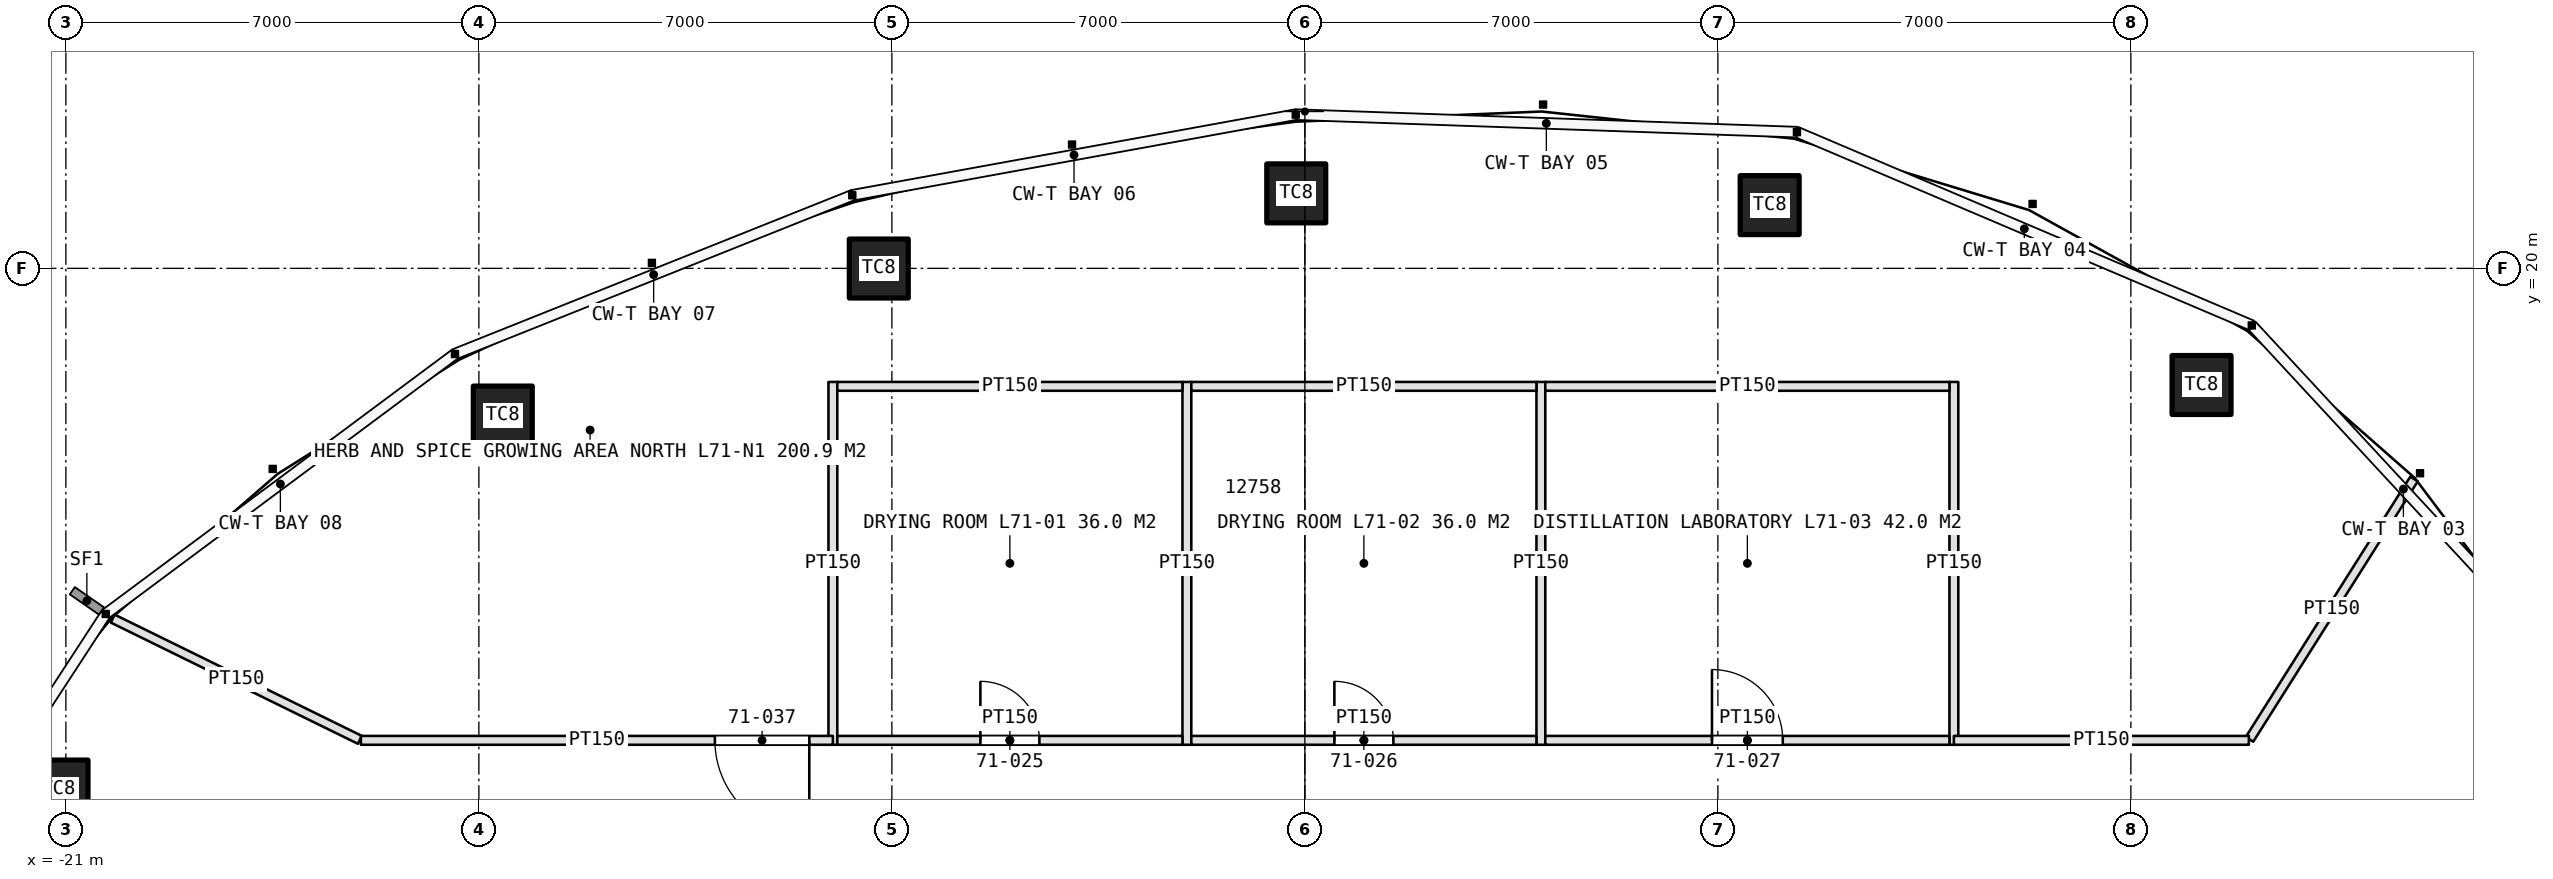
"""IFC4 building model, lengths in metres.
Left out: names, types, materials, properties, quantities, classifications, styles, units other than length and angle.
Written with IfcOpenShell. Run it as: python <this file> out.ifc"""

import sys

from ifc_helpers import new_model, si_unit, direction, frame, frame_2d, origin, origin_2d, place, context, subcontext, project, spatial, rectangle, extrude, element, fill, save


model = new_model("IFC4")
c1 = context("Model", 3, precision=1e-05, world=origin(), true_north=direction((0.0, 1.0)))
c2 = subcontext(c1, "Body", "Model", "MODEL_VIEW")
j1 = project(units=[si_unit("LENGTHUNIT", "METRE"), si_unit("PLANEANGLEUNIT", "RADIAN")], contexts=[c1])
p1 = place(None, origin())
s1 = spatial("IfcSite", under=j1, at=p1, CompositionType="ELEMENT")
p2 = place(p1, origin())
s2 = spatial("IfcBuilding", under=s1, at=p2, CompositionType="ELEMENT")
p3 = place(p2, frame((0.0, 0.0, 317.4)))
s3 = spatial("IfcBuildingStorey", under=s2, at=p3, CompositionType="ELEMENT", Elevation=317.4)
for number, where, z_axis, x_axis in (
    (1, (15.198, 18.023, 0.0), (0.0, 0.0, 1.0), (1.0, 0.0, 0.0)),
    (2, (7.878, 21.072, 0.0), (0.0, 0.0, 1.0), (1.0, 0.0, 0.0)),
    (3, (-0.146, 21.271, 0.0), (0.0, 0.0, 1.0), (1.0, 0.0, 0.0)),
    (4, (-7.222, 19.997, 0.0), (0.0, 0.0, 1.0), (1.0, 0.0, 0.0)),
    (5, (-13.595, 17.505, 0.0), (0.0, 0.0, 1.0), (1.0, 0.0, 0.0)),
    (6, (-21.125, 11.166, 0.0), (0.0, 0.0, 1.0), (1.0, 0.0, 0.0)),
):
    element("IfcColumn", number, at=place(p3, frame(where, z_axis=z_axis, x_axis=x_axis)), inside=s3, PredefinedType="COLUMN", context=c2, shape_type="SweptSolid", body=[
        extrude(rectangle(XDim=1.0, YDim=1.0, at=origin_2d()), origin(), (0.0, 0.0, 1.0), 4.2),
    ])
for number, where, z_axis, x_axis in (
    (7, (-8.0, 11.925, 0.0), (0.0, 0.0, 1.0), (0.0, 1.0, 0.0)),
    (8, (-2.0, 11.925, 0.0), (0.0, 0.0, 1.0), (0.0, 1.0, 0.0)),
    (9, (4.0, 11.925, 0.0), (0.0, 0.0, 1.0), (0.0, 1.0, 0.0)),
    (10, (11.0, 11.925, 0.0), (0.0, 0.0, 1.0), (0.0, 1.0, 0.0)),
):
    element("IfcWall", number, at=place(p3, frame(where, z_axis=z_axis, x_axis=x_axis)), inside=s3, PredefinedType="PARTITIONING", context=c2, shape_type="SweptSolid", body=[
        extrude(rectangle(XDim=6.15, YDim=0.15, at=frame_2d((3.075, 0.0))), origin(), (0.0, 0.0, 1.0), 3.0),
    ])
p4 = place(p3, frame((-7.925, 12.0, 0.0), z_axis=(0.0, 0.0, 1.0), x_axis=(1.0, 0.0, 0.0)))
e11 = element("IfcWall", 11, at=p4, inside=s3, PredefinedType="PARTITIONING", context=c2, shape_type="SweptSolid", body=[
    extrude(rectangle(XDim=5.85, YDim=0.15, at=frame_2d((2.925, 0.0))), origin(), (0.0, 0.0, 1.0), 3.0),
])
p5 = place(p4, frame((2.425, 0.0, 0.0)))
e12 = element("IfcOpeningElement", 12, at=p5, cuts=e11, PredefinedType="OPENING", context=c2, shape_type="SweptSolid", body=[
    extrude(rectangle(XDim=1.0, YDim=2.2, at=frame_2d((0.5, 1.1))), frame((0.0, 0.085, 0.0), z_axis=(0.0, -1.0, 0.0), x_axis=(1.0, 0.0, 0.0)), (0.0, 0.0, 1.0), 0.17),
])
p6 = place(p3, frame((-7.925, 18.0, 0.0), z_axis=(0.0, 0.0, 1.0), x_axis=(1.0, 0.0, 0.0)))
e13 = element("IfcWall", 13, at=p6, inside=s3, PredefinedType="PARTITIONING", context=c2, shape_type="SweptSolid", body=[
    extrude(rectangle(XDim=5.85, YDim=0.15, at=frame_2d((2.925, 0.0))), origin(), (0.0, 0.0, 1.0), 3.0),
])
p7 = place(p3, frame((-1.925, 12.0, 0.0), z_axis=(0.0, 0.0, 1.0), x_axis=(1.0, 0.0, 0.0)))
e14 = element("IfcWall", 14, at=p7, inside=s3, PredefinedType="PARTITIONING", context=c2, shape_type="SweptSolid", body=[
    extrude(rectangle(XDim=5.85, YDim=0.15, at=frame_2d((2.925, 0.0))), origin(), (0.0, 0.0, 1.0), 3.0),
])
p8 = place(p7, frame((2.425, 0.0, 0.0)))
e15 = element("IfcOpeningElement", 15, at=p8, cuts=e14, PredefinedType="OPENING", context=c2, shape_type="SweptSolid", body=[
    extrude(rectangle(XDim=1.0, YDim=2.2, at=frame_2d((0.5, 1.1))), frame((0.0, 0.085, 0.0), z_axis=(0.0, -1.0, 0.0), x_axis=(1.0, 0.0, 0.0)), (0.0, 0.0, 1.0), 0.17),
])
p9 = place(p3, frame((-1.925, 18.0, 0.0), z_axis=(0.0, 0.0, 1.0), x_axis=(1.0, 0.0, 0.0)))
e16 = element("IfcWall", 16, at=p9, inside=s3, PredefinedType="PARTITIONING", context=c2, shape_type="SweptSolid", body=[
    extrude(rectangle(XDim=5.85, YDim=0.15, at=frame_2d((2.925, 0.0))), origin(), (0.0, 0.0, 1.0), 3.0),
])
p10 = place(p3, frame((4.075, 12.0, 0.0), z_axis=(0.0, 0.0, 1.0), x_axis=(1.0, 0.0, 0.0)))
e17 = element("IfcWall", 17, at=p10, inside=s3, PredefinedType="PARTITIONING", context=c2, shape_type="SweptSolid", body=[
    extrude(rectangle(XDim=6.85, YDim=0.15, at=frame_2d((3.425, 0.0))), origin(), (0.0, 0.0, 1.0), 3.0),
])
p11 = place(p10, frame((2.825, 0.0, 0.0)))
e18 = element("IfcOpeningElement", 18, at=p11, cuts=e17, PredefinedType="OPENING", context=c2, shape_type="SweptSolid", body=[
    extrude(rectangle(XDim=1.2, YDim=2.3, at=frame_2d((0.6, 1.15))), frame((0.0, 0.085, 0.0), z_axis=(0.0, -1.0, 0.0), x_axis=(1.0, 0.0, 0.0)), (0.0, 0.0, 1.0), 0.17),
])
p12 = place(p3, frame((4.075, 18.0, 0.0), z_axis=(0.0, 0.0, 1.0), x_axis=(1.0, 0.0, 0.0)))
e19 = element("IfcWall", 19, at=p12, inside=s3, PredefinedType="PARTITIONING", context=c2, shape_type="SweptSolid", body=[
    extrude(rectangle(XDim=6.85, YDim=0.15, at=frame_2d((3.425, 0.0))), origin(), (0.0, 0.0, 1.0), 3.0),
])
p13 = place(p3, frame((-16.018, 12.009, 0.0), z_axis=(0.0, 0.0, 1.0), x_axis=(-0.897771840996, 0.440460805879, 0.0)))
e20 = element("IfcWall", 20, at=p13, inside=s3, PredefinedType="PARTITIONING", context=c2, shape_type="SweptSolid", body=[
    extrude(rectangle(XDim=4.666, YDim=0.15, at=frame_2d((2.333, 0.0))), origin(), (0.0, 0.0, 1.0), 3.0),
])
p14 = place(p3, frame((16.011, 12.017, 0.0), z_axis=(0.0, 0.0, 1.0), x_axis=(0.53415837449, 0.845384427916, 0.0)))
e21 = element("IfcWall", 21, at=p14, inside=s3, PredefinedType="PARTITIONING", context=c2, shape_type="SweptSolid", body=[
    extrude(rectangle(XDim=5.22, YDim=0.15, at=frame_2d((2.61, 0.0))), origin(), (0.0, 0.0, 1.0), 3.0),
])
p15 = place(p3, frame((-8.0, 12.0, 0.0), z_axis=(0.0, 0.0, 1.0), x_axis=(-1.0, 0.0, 0.0)))
e22 = element("IfcWall", 22, at=p15, inside=s3, PredefinedType="PARTITIONING", context=c2, shape_type="SweptSolid", body=[
    extrude(rectangle(XDim=8.0, YDim=0.15, at=frame_2d((4.0, 0.0))), origin(), (0.0, 0.0, 1.0), 3.0),
])
p16 = place(p15, frame((0.4, 0.0, 0.0)))
e23 = element("IfcOpeningElement", 23, at=p16, cuts=e22, PredefinedType="OPENING", context=c2, shape_type="SweptSolid", body=[
    extrude(rectangle(XDim=1.6, YDim=2.4, at=frame_2d((0.8, 1.2))), frame((0.0, 0.085, 0.0), z_axis=(0.0, -1.0, 0.0), x_axis=(1.0, 0.0, 0.0)), (0.0, 0.0, 1.0), 0.17),
])
p17 = place(p3, frame((16.0, 12.0, 0.0), z_axis=(0.0, 0.0, 1.0), x_axis=(-1.0, 0.0, 0.0)))
e24 = element("IfcWall", 24, at=p17, inside=s3, PredefinedType="PARTITIONING", context=c2, shape_type="SweptSolid", body=[
    extrude(rectangle(XDim=5.0, YDim=0.15, at=frame_2d((2.5, 0.0))), origin(), (0.0, 0.0, 1.0), 3.0),
])
p18 = place(p5, origin())
e25 = element("IfcDoor", 25, at=p18, inside=s3, OperationType="SINGLE_SWING_LEFT", PredefinedType="DOOR", context=c2, shape_type="SweptSolid", body=[
    extrude(rectangle(XDim=1.0, YDim=2.2, at=frame_2d((0.5, 1.1))), frame((0.0, 0.025, 0.0), z_axis=(0.0, -1.0, 0.0), x_axis=(1.0, 0.0, 0.0)), (0.0, 0.0, 1.0), 0.05),
])
fill(e12, e25)
p19 = place(p8, origin())
e26 = element("IfcDoor", 26, at=p19, inside=s3, OperationType="SINGLE_SWING_LEFT", PredefinedType="DOOR", context=c2, shape_type="SweptSolid", body=[
    extrude(rectangle(XDim=1.0, YDim=2.2, at=frame_2d((0.5, 1.1))), frame((0.0, 0.025, 0.0), z_axis=(0.0, -1.0, 0.0), x_axis=(1.0, 0.0, 0.0)), (0.0, 0.0, 1.0), 0.05),
])
fill(e15, e26)
p20 = place(p11, origin())
e27 = element("IfcDoor", 27, at=p20, inside=s3, OperationType="SINGLE_SWING_LEFT", PredefinedType="DOOR", context=c2, shape_type="SweptSolid", body=[
    extrude(rectangle(XDim=1.2, YDim=2.3, at=frame_2d((0.6, 1.15))), frame((0.0, 0.025, 0.0), z_axis=(0.0, -1.0, 0.0), x_axis=(1.0, 0.0, 0.0)), (0.0, 0.0, 1.0), 0.05),
])
fill(e18, e27)
p21 = place(p16, origin())
e28 = element("IfcDoor", 28, at=p21, inside=s3, OperationType="DOUBLE_DOOR_SINGLE_SWING", PredefinedType="DOOR", context=c2, shape_type="SweptSolid", body=[
    extrude(rectangle(XDim=1.6, YDim=2.4, at=frame_2d((0.8, 1.2))), frame((0.0, 0.025, 0.0), z_axis=(0.0, -1.0, 0.0), x_axis=(1.0, 0.0, 0.0)), (0.0, 0.0, 1.0), 0.05),
])
fill(e23, e28)
save(model, sys.argv[1])
